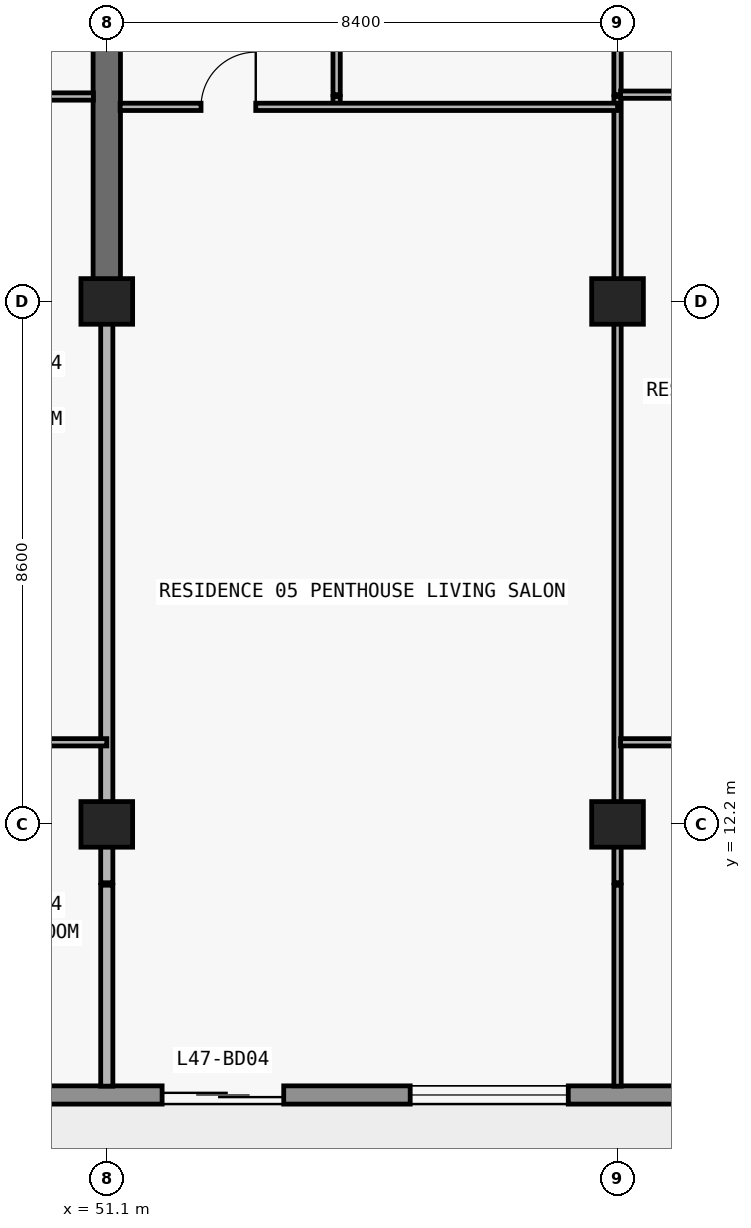
"""IFC4 building model, lengths in metres.
Left out: names, types, materials, properties, quantities, classifications, styles, units other than length and angle.
Written with IfcOpenShell. Run it as: python <this file> out.ifc"""

import sys

from ifc_helpers import new_model, si_unit, direction, frame, frame_2d, origin, origin_2d, place, context, subcontext, project, spatial, rectangle, extrude, element, fill, save


model = new_model("IFC4")
c1 = context("Model", 3, precision=1e-05, world=origin(), true_north=direction((0.0, 1.0)))
c2 = subcontext(c1, "Body", "Model", "MODEL_VIEW")
j1 = project(units=[si_unit("LENGTHUNIT", "METRE"), si_unit("PLANEANGLEUNIT", "RADIAN")], contexts=[c1])
p1 = place(None, origin())
s1 = spatial("IfcSite", under=j1, at=p1, CompositionType="ELEMENT")
p2 = place(p1, origin())
s2 = spatial("IfcBuilding", under=s1, at=p2, CompositionType="ELEMENT")
p3 = place(p2, frame((0.0, 0.0, 170.4)))
s3 = spatial("IfcBuildingStorey", under=s2, at=p3, CompositionType="ELEMENT", Elevation=170.4)
for number, where, z_axis, x_axis in (
    (1, (51.1, 12.2, 0.0), (0.0, 0.0, 1.0), (1.0, 0.0, 0.0)),
    (2, (59.5, 12.2, 0.0), (0.0, 0.0, 1.0), (1.0, 0.0, 0.0)),
    (3, (51.1, 20.8, 0.0), (0.0, 0.0, 1.0), (1.0, 0.0, 0.0)),
    (4, (59.5, 20.8, 0.0), (0.0, 0.0, 1.0), (1.0, 0.0, 0.0)),
):
    element("IfcColumn", number, at=place(p3, frame(where, z_axis=z_axis, x_axis=x_axis)), inside=s3, PredefinedType="COLUMN", context=c2, shape_type="SweptSolid", body=[
        extrude(rectangle(XDim=0.85, YDim=0.75, at=origin_2d()), origin(), (0.0, 0.0, 1.0), 3.05),
    ])
p4 = place(p3, frame((51.1, 20.8, 0.0), z_axis=(0.0, 0.0, 1.0), x_axis=(0.0, 1.0, 0.0)))
e5 = element("IfcWall", 5, at=p4, inside=s3, PredefinedType="SHEAR", context=c2, shape_type="SweptSolid", body=[
    extrude(rectangle(XDim=8.6, YDim=0.45, at=frame_2d((4.3, 0.0))), origin(), (0.0, 0.0, 1.0), 3.05),
])
p5 = place(p3, frame((67.7, 7.75, 0.0), z_axis=(0.0, 0.0, 1.0), x_axis=(-1.0, 0.0, 0.0)))
e6 = element("IfcWall", 6, at=p5, inside=s3, PredefinedType="STANDARD", context=c2, shape_type="SweptSolid", body=[
    extrude(rectangle(XDim=57.6, YDim=0.3, at=frame_2d((28.8, 0.0))), origin(), (0.0, 0.0, 1.0), 3.05),
])
p6 = place(p5, frame((54.69, 0.0, 0.0)))
e7 = element("IfcOpeningElement", 7, at=p6, cuts=e6, PredefinedType="OPENING", context=c2, shape_type="SweptSolid", body=[
    extrude(rectangle(XDim=2.0, YDim=2.3, at=frame_2d((1.0, 1.15))), frame((0.0, 0.16, 0.0), z_axis=(0.0, -1.0, 0.0), x_axis=(1.0, 0.0, 0.0)), (0.0, 0.0, 1.0), 0.32),
])
p7 = place(p5, frame((50.21, 0.0, 0.65)))
e8 = element("IfcOpeningElement", 8, at=p7, cuts=e6, PredefinedType="OPENING", context=c2, shape_type="SweptSolid", body=[
    extrude(rectangle(XDim=2.6, YDim=1.85, at=frame_2d((1.3, 0.925))), frame((0.0, 0.16, 0.0), z_axis=(0.0, -1.0, 0.0), x_axis=(1.0, 0.0, 0.0)), (0.0, 0.0, 1.0), 0.32),
])
p8 = place(p5, frame((44.1, 0.0, 0.85)))
e9 = element("IfcOpeningElement", 9, at=p8, cuts=e6, PredefinedType="OPENING", context=c2, shape_type="SweptSolid", body=[
    extrude(rectangle(XDim=2.2, YDim=1.55, at=frame_2d((1.1, 0.775))), frame((0.0, 0.16, 0.0), z_axis=(0.0, -1.0, 0.0), x_axis=(1.0, 0.0, 0.0)), (0.0, 0.0, 1.0), 0.32),
])
p9 = place(p5, frame((37.69, 0.0, 0.0)))
e10 = element("IfcOpeningElement", 10, at=p9, cuts=e6, PredefinedType="OPENING", context=c2, shape_type="SweptSolid", body=[
    extrude(rectangle(XDim=2.0, YDim=2.3, at=frame_2d((1.0, 1.15))), frame((0.0, 0.16, 0.0), z_axis=(0.0, -1.0, 0.0), x_axis=(1.0, 0.0, 0.0)), (0.0, 0.0, 1.0), 0.32),
])
p10 = place(p5, frame((33.59, 0.0, 0.85)))
e11 = element("IfcOpeningElement", 11, at=p10, cuts=e6, PredefinedType="OPENING", context=c2, shape_type="SweptSolid", body=[
    extrude(rectangle(XDim=1.8, YDim=1.55, at=frame_2d((0.9, 0.775))), frame((0.0, 0.16, 0.0), z_axis=(0.0, -1.0, 0.0), x_axis=(1.0, 0.0, 0.0)), (0.0, 0.0, 1.0), 0.32),
])
p11 = place(p5, frame((25.914, 0.0, 0.85)))
e12 = element("IfcOpeningElement", 12, at=p11, cuts=e6, PredefinedType="OPENING", context=c2, shape_type="SweptSolid", body=[
    extrude(rectangle(XDim=2.2, YDim=1.55, at=frame_2d((1.1, 0.775))), frame((0.0, 0.16, 0.0), z_axis=(0.0, -1.0, 0.0), x_axis=(1.0, 0.0, 0.0)), (0.0, 0.0, 1.0), 0.32),
])
p12 = place(p5, frame((21.69, 0.0, 0.0)))
e13 = element("IfcOpeningElement", 13, at=p12, cuts=e6, PredefinedType="OPENING", context=c2, shape_type="SweptSolid", body=[
    extrude(rectangle(XDim=2.0, YDim=2.3, at=frame_2d((1.0, 1.15))), frame((0.0, 0.16, 0.0), z_axis=(0.0, -1.0, 0.0), x_axis=(1.0, 0.0, 0.0)), (0.0, 0.0, 1.0), 0.32),
])
p13 = place(p5, frame((17.59, 0.0, 0.85)))
e14 = element("IfcOpeningElement", 14, at=p13, cuts=e6, PredefinedType="OPENING", context=c2, shape_type="SweptSolid", body=[
    extrude(rectangle(XDim=1.8, YDim=1.55, at=frame_2d((0.9, 0.775))), frame((0.0, 0.16, 0.0), z_axis=(0.0, -1.0, 0.0), x_axis=(1.0, 0.0, 0.0)), (0.0, 0.0, 1.0), 0.32),
])
p14 = place(p5, frame((13.69, 0.0, 0.0)))
e15 = element("IfcOpeningElement", 15, at=p14, cuts=e6, PredefinedType="OPENING", context=c2, shape_type="SweptSolid", body=[
    extrude(rectangle(XDim=2.0, YDim=2.3, at=frame_2d((1.0, 1.15))), frame((0.0, 0.16, 0.0), z_axis=(0.0, -1.0, 0.0), x_axis=(1.0, 0.0, 0.0)), (0.0, 0.0, 1.0), 0.32),
])
p15 = place(p5, frame((9.01, 0.0, 0.65)))
e16 = element("IfcOpeningElement", 16, at=p15, cuts=e6, PredefinedType="OPENING", context=c2, shape_type="SweptSolid", body=[
    extrude(rectangle(XDim=2.6, YDim=1.85, at=frame_2d((1.3, 0.925))), frame((0.0, 0.16, 0.0), z_axis=(0.0, -1.0, 0.0), x_axis=(1.0, 0.0, 0.0)), (0.0, 0.0, 1.0), 0.32),
])
p16 = place(p5, frame((3.0, 0.0, 0.85)))
e17 = element("IfcOpeningElement", 17, at=p16, cuts=e6, PredefinedType="OPENING", context=c2, shape_type="SweptSolid", body=[
    extrude(rectangle(XDim=2.2, YDim=1.55, at=frame_2d((1.1, 0.775))), frame((0.0, 0.16, 0.0), z_axis=(0.0, -1.0, 0.0), x_axis=(1.0, 0.0, 0.0)), (0.0, 0.0, 1.0), 0.32),
])
p17 = place(p3, frame((51.1, 7.895, 0.0), z_axis=(0.0, 0.0, 1.0), x_axis=(0.0, 1.0, 0.0)))
e18 = element("IfcWall", 18, at=p17, inside=s3, PredefinedType="PARTITIONING", context=c2, shape_type="SweptSolid", body=[
    extrude(rectangle(XDim=3.305, YDim=0.2, at=frame_2d((1.652, 0.0))), origin(), (0.0, 0.0, 1.0), 3.05),
])
p18 = place(p3, frame((51.1, 11.24, 0.0), z_axis=(0.0, 0.0, 1.0), x_axis=(0.0, 1.0, 0.0)))
e19 = element("IfcWall", 19, at=p18, inside=s3, PredefinedType="PARTITIONING", context=c2, shape_type="SweptSolid", body=[
    extrude(rectangle(XDim=9.555, YDim=0.2, at=frame_2d((4.777, 0.0))), origin(), (0.0, 0.0, 1.0), 2.263),
])
p19 = place(p3, frame((54.88, 24.0, 0.0), z_axis=(0.0, 0.0, 1.0), x_axis=(0.0, 1.0, 0.0)))
e20 = element("IfcWall", 20, at=p19, inside=s3, PredefinedType="PARTITIONING", context=c2, shape_type="SweptSolid", body=[
    extrude(rectangle(XDim=0.17, YDim=0.12, at=frame_2d((0.085, 0.0))), origin(), (0.0, 0.0, 1.0), 3.05),
])
p20 = place(p3, frame((54.88, 24.2, 0.0), z_axis=(0.0, 0.0, 1.0), x_axis=(0.0, 1.0, 0.0)))
e21 = element("IfcWall", 21, at=p20, inside=s3, PredefinedType="PARTITIONING", context=c2, shape_type="SweptSolid", body=[
    extrude(rectangle(XDim=4.6, YDim=0.12, at=frame_2d((2.3, 0.0))), origin(), (0.0, 0.0, 1.0), 3.05),
])
p21 = place(p20, frame((1.85, 0.0, 0.0)))
e22 = element("IfcOpeningElement", 22, at=p21, cuts=e21, PredefinedType="OPENING", context=c2, shape_type="SweptSolid", body=[
    extrude(rectangle(XDim=0.9, YDim=2.15, at=frame_2d((0.45, 1.075))), frame((0.0, 0.07, 0.0), z_axis=(0.0, -1.0, 0.0), x_axis=(1.0, 0.0, 0.0)), (0.0, 0.0, 1.0), 0.14),
])
p22 = place(p3, frame((59.5, 7.895, 0.0), z_axis=(0.0, 0.0, 1.0), x_axis=(0.0, 1.0, 0.0)))
e23 = element("IfcWall", 23, at=p22, inside=s3, PredefinedType="PARTITIONING", context=c2, shape_type="SweptSolid", body=[
    extrude(rectangle(XDim=3.305, YDim=0.12, at=frame_2d((1.652, 0.0))), origin(), (0.0, 0.0, 1.0), 3.05),
])
p23 = place(p3, frame((59.5, 11.24, 0.0), z_axis=(0.0, 0.0, 1.0), x_axis=(0.0, 1.0, 0.0)))
e24 = element("IfcWall", 24, at=p23, inside=s3, PredefinedType="PARTITIONING", context=c2, shape_type="SweptSolid", body=[
    extrude(rectangle(XDim=12.93, YDim=0.12, at=frame_2d((6.465, 0.0))), origin(), (0.0, 0.0, 1.0), 2.263),
])
p24 = place(p3, frame((59.5, 24.2, 0.0), z_axis=(0.0, 0.0, 1.0), x_axis=(0.0, 1.0, 0.0)))
e25 = element("IfcWall", 25, at=p24, inside=s3, PredefinedType="PARTITIONING", context=c2, shape_type="SweptSolid", body=[
    extrude(rectangle(XDim=4.84, YDim=0.12, at=frame_2d((2.42, 0.0))), origin(), (0.0, 0.0, 1.0), 2.263),
])
p25 = place(p24, frame((1.75, 0.0, 0.0)))
e26 = element("IfcOpeningElement", 26, at=p25, cuts=e25, PredefinedType="OPENING", context=c2, shape_type="SweptSolid", body=[
    extrude(rectangle(XDim=0.9, YDim=2.15, at=frame_2d((0.45, 1.075))), frame((0.0, 0.07, 0.0), z_axis=(0.0, -1.0, 0.0), x_axis=(1.0, 0.0, 0.0)), (0.0, 0.0, 1.0), 0.14),
])
p26 = place(p3, frame((47.32, 13.55, 0.0), z_axis=(0.0, 0.0, 1.0), x_axis=(1.0, 0.0, 0.0)))
e27 = element("IfcWall", 27, at=p26, inside=s3, PredefinedType="PARTITIONING", context=c2, shape_type="SweptSolid", body=[
    extrude(rectangle(XDim=3.78, YDim=0.12, at=frame_2d((1.89, 0.0))), origin(), (0.0, 0.0, 1.0), 3.05),
])
p27 = place(p26, frame((1.44, 0.0, 0.0)))
e28 = element("IfcOpeningElement", 28, at=p27, cuts=e27, PredefinedType="OPENING", context=c2, shape_type="SweptSolid", body=[
    extrude(rectangle(XDim=0.9, YDim=2.15, at=frame_2d((0.45, 1.075))), frame((0.0, 0.07, 0.0), z_axis=(0.0, -1.0, 0.0), x_axis=(1.0, 0.0, 0.0)), (0.0, 0.0, 1.0), 0.14),
])
p28 = place(p3, frame((59.55, 13.55, 0.0), z_axis=(0.0, 0.0, 1.0), x_axis=(1.0, 0.0, 0.0)))
e29 = element("IfcWall", 29, at=p28, inside=s3, PredefinedType="PARTITIONING", context=c2, shape_type="SweptSolid", body=[
    extrude(rectangle(XDim=8.15, YDim=0.12, at=frame_2d((4.075, 0.0))), origin(), (0.0, 0.0, 1.0), 3.05),
])
p29 = place(p28, frame((3.625, 0.0, 0.0)))
e30 = element("IfcOpeningElement", 30, at=p29, cuts=e29, PredefinedType="OPENING", context=c2, shape_type="SweptSolid", body=[
    extrude(rectangle(XDim=0.9, YDim=2.15, at=frame_2d((0.45, 1.075))), frame((0.0, 0.07, 0.0), z_axis=(0.0, -1.0, 0.0), x_axis=(1.0, 0.0, 0.0)), (0.0, 0.0, 1.0), 0.14),
])
p30 = place(p3, frame((51.32, 24.0, 0.0), z_axis=(0.0, 0.0, 1.0), x_axis=(1.0, 0.0, 0.0)))
e31 = element("IfcWall", 31, at=p30, inside=s3, PredefinedType="PARTITIONING", context=c2, shape_type="SweptSolid", body=[
    extrude(rectangle(XDim=8.18, YDim=0.12, at=frame_2d((4.09, 0.0))), origin(), (0.0, 0.0, 1.0), 3.05),
])
p31 = place(p30, frame((1.33, 0.0, 0.0)))
e32 = element("IfcOpeningElement", 32, at=p31, cuts=e31, PredefinedType="OPENING", context=c2, shape_type="SweptSolid", body=[
    extrude(rectangle(XDim=0.9, YDim=2.15, at=frame_2d((0.45, 1.075))), frame((0.0, 0.07, 0.0), z_axis=(0.0, -1.0, 0.0), x_axis=(1.0, 0.0, 0.0)), (0.0, 0.0, 1.0), 0.14),
])
p32 = place(p3, frame((42.7, 24.17, 0.0), z_axis=(0.0, 0.0, 1.0), x_axis=(1.0, 0.0, 0.0)))
e33 = element("IfcWall", 33, at=p32, inside=s3, PredefinedType="PARTITIONING", context=c2, shape_type="SweptSolid", body=[
    extrude(rectangle(XDim=8.18, YDim=0.12, at=frame_2d((4.09, 0.0))), origin(), (0.0, 0.0, 1.0), 3.05),
])
p33 = place(p32, frame((1.86, 0.0, 0.0)))
e34 = element("IfcOpeningElement", 34, at=p33, cuts=e33, PredefinedType="OPENING", context=c2, shape_type="SweptSolid", body=[
    extrude(rectangle(XDim=0.9, YDim=2.15, at=frame_2d((0.45, 1.075))), frame((0.0, 0.07, 0.0), z_axis=(0.0, -1.0, 0.0), x_axis=(1.0, 0.0, 0.0)), (0.0, 0.0, 1.0), 0.14),
])
p34 = place(p32, frame((6.033, 0.0, 0.0)))
e35 = element("IfcOpeningElement", 35, at=p34, cuts=e33, PredefinedType="OPENING", context=c2, shape_type="SweptSolid", body=[
    extrude(rectangle(XDim=0.9, YDim=2.15, at=frame_2d((0.45, 1.075))), frame((0.0, 0.07, 0.0), z_axis=(0.0, -1.0, 0.0), x_axis=(1.0, 0.0, 0.0)), (0.0, 0.0, 1.0), 0.14),
])
p35 = place(p3, frame((59.55, 24.2, 0.0), z_axis=(0.0, 0.0, 1.0), x_axis=(1.0, 0.0, 0.0)))
e36 = element("IfcWall", 36, at=p35, inside=s3, PredefinedType="PARTITIONING", context=c2, shape_type="SweptSolid", body=[
    extrude(rectangle(XDim=8.15, YDim=0.12, at=frame_2d((4.075, 0.0))), origin(), (0.0, 0.0, 1.0), 3.05),
])
p36 = place(p35, frame((3.625, 0.0, 0.0)))
e37 = element("IfcOpeningElement", 37, at=p36, cuts=e36, PredefinedType="OPENING", context=c2, shape_type="SweptSolid", body=[
    extrude(rectangle(XDim=0.9, YDim=2.15, at=frame_2d((0.45, 1.075))), frame((0.0, 0.07, 0.0), z_axis=(0.0, -1.0, 0.0), x_axis=(1.0, 0.0, 0.0)), (0.0, 0.0, 1.0), 0.14),
])
p37 = place(p14, origin())
e38 = element("IfcDoor", 38, at=p37, inside=s3, OperationType="DOUBLE_DOOR_SLIDING", PredefinedType="DOOR", context=c2, shape_type="SweptSolid", body=[
    extrude(rectangle(XDim=2.0, YDim=2.3, at=frame_2d((1.0, 1.15))), frame((0.0, 0.025, 0.0), z_axis=(0.0, -1.0, 0.0), x_axis=(1.0, 0.0, 0.0)), (0.0, 0.0, 1.0), 0.05),
])
fill(e15, e38)
p38 = place(p15, origin())
e39 = element("IfcWindow", 39, at=p38, inside=s3, PartitioningType="SINGLE_PANEL", PredefinedType="WINDOW", context=c2, shape_type="SweptSolid", body=[
    extrude(rectangle(XDim=2.6, YDim=1.85, at=frame_2d((1.3, 0.925))), frame((0.0, 0.03, 0.0), z_axis=(0.0, -1.0, 0.0), x_axis=(1.0, 0.0, 0.0)), (0.0, 0.0, 1.0), 0.06),
])
fill(e16, e39)
p39 = place(p31, origin())
e40 = element("IfcDoor", 40, at=p39, inside=s3, OperationType="SINGLE_SWING_RIGHT", PredefinedType="DOOR", context=c2, shape_type="SweptSolid", body=[
    extrude(rectangle(XDim=0.9, YDim=2.15, at=frame_2d((0.45, 1.075))), frame((0.0, 0.025, 0.0), z_axis=(0.0, -1.0, 0.0), x_axis=(1.0, 0.0, 0.0)), (0.0, 0.0, 1.0), 0.05),
])
fill(e32, e40)
save(model, sys.argv[1])
